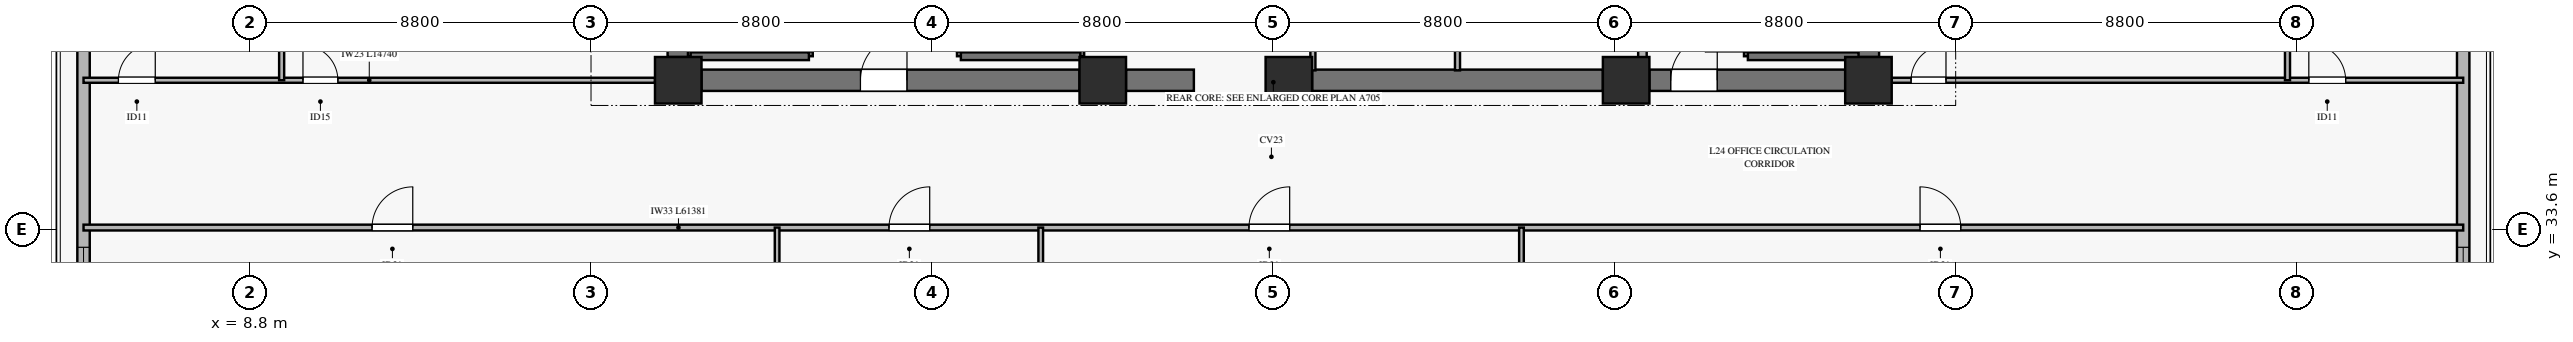
"""IFC4 building model, lengths in metres.
Left out: names, types, materials, properties, quantities, classifications, styles, units other than length and angle.
Written with IfcOpenShell. Run it as: python <this file> out.ifc"""

import sys

from ifc_helpers import new_model, si_unit, direction, frame, frame_2d, origin, origin_2d, place, context, subcontext, project, spatial, rectangle, extrude, source, transform, mapped, element, fill, save


model = new_model("IFC4")
c1 = context("Model", 3, precision=1e-05, world=origin(), true_north=direction((0.0, 1.0)))
c2 = subcontext(c1, "Body", "Model", "MODEL_VIEW")
j1 = project(units=[si_unit("LENGTHUNIT", "METRE"), si_unit("PLANEANGLEUNIT", "RADIAN")], contexts=[c1])
p1 = place(None, origin())
s1 = spatial("IfcSite", under=j1, at=p1, CompositionType="ELEMENT")
p2 = place(p1, origin())
s2 = spatial("IfcBuilding", under=s1, at=p2, CompositionType="ELEMENT")
p3 = place(p2, frame((0.0, 0.0, 99.7)))
s3 = spatial("IfcBuildingStorey", under=s2, at=p3, CompositionType="ELEMENT", Elevation=99.7)
m1 = source(origin(), c2, "Body", "SweptSolid", [
    extrude(rectangle(XDim=1.2, YDim=1.2, at=origin_2d()), origin(), (0.0, 0.0, 1.0), 3.68),
])
for number, where, z_axis, x_axis in (
    (1, (19.85, 37.45, 0.0), (0.0, 0.0, 1.0), (1.0, 0.0, 0.0)),
    (2, (30.8, 37.45, 0.0), (0.0, 0.0, 1.0), (1.0, 0.0, 0.0)),
    (3, (35.6, 37.45, 0.0), (0.0, 0.0, 1.0), (1.0, 0.0, 0.0)),
    (4, (44.3, 37.45, 0.0), (0.0, 0.0, 1.0), (1.0, 0.0, 0.0)),
    (5, (50.55, 37.45, 0.0), (0.0, 0.0, 1.0), (1.0, 0.0, 0.0)),
):
    element("IfcColumn", number, at=place(p3, frame(where, z_axis=z_axis, x_axis=x_axis)), inside=s3, PredefinedType="PILASTER", context=c2, shape_type="MappedRepresentation", body=[
        mapped(m1, transform((0.0, 0.0, 0.0), x_axis=(1.0, 0.0, 0.0), y_axis=(0.0, 1.0, 0.0), z_axis=(0.0, 0.0, 1.0), scale=1.0)),
    ])
p4 = place(p3, frame((20.45, 37.45, 0.0), z_axis=(0.0, 0.0, 1.0), x_axis=(1.0, 0.0, 0.0)))
e6 = element("IfcWall", 6, at=p4, inside=s3, PredefinedType="SHEAR", context=c2, shape_type="SweptSolid", body=[
    extrude(rectangle(XDim=9.75, YDim=0.55, at=frame_2d((4.875, 0.0))), origin(), (0.0, 0.0, 1.0), 3.68),
])
p5 = place(p4, frame((4.1, 0.0, 0.0)))
e7 = element("IfcOpeningElement", 7, at=p5, cuts=e6, PredefinedType="OPENING", context=c2, shape_type="SweptSolid", body=[
    extrude(rectangle(XDim=1.2, YDim=2.15, at=frame_2d((0.6, 1.075))), frame((0.0, 0.285, 0.0), z_axis=(0.0, -1.0, 0.0), x_axis=(1.0, 0.0, 0.0)), (0.0, 0.0, 1.0), 0.57),
])
p6 = place(p3, frame((31.4, 37.45, 0.0), z_axis=(0.0, 0.0, 1.0), x_axis=(1.0, 0.0, 0.0)))
e8 = element("IfcWall", 8, at=p6, inside=s3, PredefinedType="SHEAR", context=c2, shape_type="SweptSolid", body=[
    extrude(rectangle(XDim=1.75, YDim=0.55, at=frame_2d((0.875, 0.0))), origin(), (0.0, 0.0, 1.0), 3.68),
])
p7 = place(p3, frame((36.2, 37.45, 0.0), z_axis=(0.0, 0.0, 1.0), x_axis=(1.0, 0.0, 0.0)))
e9 = element("IfcWall", 9, at=p7, inside=s3, PredefinedType="SHEAR", context=c2, shape_type="SweptSolid", body=[
    extrude(rectangle(XDim=7.5, YDim=0.55, at=frame_2d((3.75, 0.0))), origin(), (0.0, 0.0, 1.0), 3.68),
])
p8 = place(p3, frame((44.9, 37.45, 0.0), z_axis=(0.0, 0.0, 1.0), x_axis=(1.0, 0.0, 0.0)))
e10 = element("IfcWall", 10, at=p8, inside=s3, PredefinedType="SHEAR", context=c2, shape_type="SweptSolid", body=[
    extrude(rectangle(XDim=5.05, YDim=0.55, at=frame_2d((2.525, 0.0))), origin(), (0.0, 0.0, 1.0), 3.68),
])
p9 = place(p8, frame((0.55, 0.0, 0.0)))
e11 = element("IfcOpeningElement", 11, at=p9, cuts=e10, PredefinedType="OPENING", context=c2, shape_type="SweptSolid", body=[
    extrude(rectangle(XDim=1.2, YDim=2.15, at=frame_2d((0.6, 1.075))), frame((0.0, 0.285, 0.0), z_axis=(0.0, -1.0, 0.0), x_axis=(1.0, 0.0, 0.0)), (0.0, 0.0, 1.0), 0.57),
])
for number, where, z_axis, x_axis in (
    (12, (19.85, 38.05, 0.0), (0.0, 0.0, 1.0), (0.0, 1.0, 0.0)),
    (13, (50.55, 38.05, 0.0), (0.0, 0.0, 1.0), (0.0, 1.0, 0.0)),
):
    element("IfcWall", number, at=place(p3, frame(where, z_axis=z_axis, x_axis=x_axis)), inside=s3, PredefinedType="SHEAR", context=c2, shape_type="SweptSolid", body=[
        extrude(rectangle(XDim=7.9, YDim=0.55, at=frame_2d((3.95, 0.0))), origin(), (0.0, 0.0, 1.0), 3.68),
    ])
p10 = place(p3, frame((4.51, 26.73, 0.0), z_axis=(0.0, 0.0, 1.0), x_axis=(0.0, 1.0, 0.0)))
e14 = element("IfcWall", 14, at=p10, inside=s3, PredefinedType="SOLIDWALL", context=c2, shape_type="SweptSolid", body=[
    extrude(rectangle(XDim=16.326, YDim=0.32, at=frame_2d((8.163, 0.0))), origin(), (0.0, 0.0, 1.0), 3.16),
])
p11 = place(p10, frame((4.011, 0.0, 0.45)))
e15 = element("IfcOpeningElement", 15, at=p11, cuts=e14, PredefinedType="OPENING", context=c2, shape_type="SweptSolid", body=[
    extrude(rectangle(XDim=2.4, YDim=2.1, at=frame_2d((1.2, 1.05))), frame((0.0, 0.17, 0.0), z_axis=(0.0, -1.0, 0.0), x_axis=(1.0, 0.0, 0.0)), (0.0, 0.0, 1.0), 0.34),
])
p12 = place(p3, frame((65.891, 26.73, 0.0), z_axis=(0.0, 0.0, 1.0), x_axis=(0.0, 1.0, 0.0)))
e16 = element("IfcWall", 16, at=p12, inside=s3, PredefinedType="SOLIDWALL", context=c2, shape_type="SweptSolid", body=[
    extrude(rectangle(XDim=16.326, YDim=0.32, at=frame_2d((8.163, 0.0))), origin(), (0.0, 0.0, 1.0), 3.16),
])
p13 = place(p12, frame((4.011, 0.0, 0.45)))
e17 = element("IfcOpeningElement", 17, at=p13, cuts=e16, PredefinedType="OPENING", context=c2, shape_type="SweptSolid", body=[
    extrude(rectangle(XDim=2.4, YDim=2.1, at=frame_2d((1.2, 1.05))), frame((0.0, 0.17, 0.0), z_axis=(0.0, -1.0, 0.0), x_axis=(1.0, 0.0, 0.0)), (0.0, 0.0, 1.0), 0.34),
])
p14 = place(p3, frame((20.17, 38.07, 0.0), z_axis=(0.0, 0.0, 1.0), x_axis=(0.0, 1.0, 0.0)))
e18 = element("IfcWall", 18, at=p14, inside=s3, PredefinedType="SOLIDWALL", context=c2, shape_type="SweptSolid", body=[
    extrude(rectangle(XDim=7.25, YDim=0.14, at=frame_2d((3.625, 0.0))), origin(), (0.0, 0.0, 1.0), 3.9),
])
p15 = place(p3, frame((23.22, 38.07, 0.0), z_axis=(0.0, 0.0, 1.0), x_axis=(0.0, 1.0, 0.0)))
e19 = element("IfcWall", 19, at=p15, inside=s3, PredefinedType="SOLIDWALL", context=c2, shape_type="SweptSolid", body=[
    extrude(rectangle(XDim=7.25, YDim=0.2, at=frame_2d((3.625, 0.0))), origin(), (0.0, 0.0, 1.0), 3.9),
])
p16 = place(p15, frame((0.11, 0.0, 0.0)))
e20 = element("IfcOpeningElement", 20, at=p16, cuts=e19, PredefinedType="OPENING", context=c2, shape_type="SweptSolid", body=[
    extrude(rectangle(XDim=1.1, YDim=2.15, at=frame_2d((0.55, 1.075))), frame((0.0, 0.11, 0.0), z_axis=(0.0, -1.0, 0.0), x_axis=(1.0, 0.0, 0.0)), (0.0, 0.0, 1.0), 0.22),
])
p17 = place(p3, frame((20.17, 38.07, 0.0), z_axis=(0.0, 0.0, 1.0), x_axis=(1.0, 0.0, 0.0)))
e21 = element("IfcWall", 21, at=p17, inside=s3, PredefinedType="SOLIDWALL", context=c2, shape_type="SweptSolid", body=[
    extrude(rectangle(XDim=3.05, YDim=0.2, at=frame_2d((1.525, 0.0))), origin(), (0.0, 0.0, 1.0), 3.9),
])
p18 = place(p3, frame((27.14, 38.07, 0.0), z_axis=(0.0, 0.0, 1.0), x_axis=(0.0, 1.0, 0.0)))
e22 = element("IfcWall", 22, at=p18, inside=s3, PredefinedType="SOLIDWALL", context=c2, shape_type="SweptSolid", body=[
    extrude(rectangle(XDim=7.25, YDim=0.2, at=frame_2d((3.625, 0.0))), origin(), (0.0, 0.0, 1.0), 3.9),
])
p19 = place(p18, frame((0.11, 0.0, 0.0)))
e23 = element("IfcOpeningElement", 23, at=p19, cuts=e22, PredefinedType="OPENING", context=c2, shape_type="SweptSolid", body=[
    extrude(rectangle(XDim=1.1, YDim=2.15, at=frame_2d((0.55, 1.075))), frame((0.0, 0.11, 0.0), z_axis=(0.0, -1.0, 0.0), x_axis=(1.0, 0.0, 0.0)), (0.0, 0.0, 1.0), 0.22),
])
p20 = place(p3, frame((30.22, 38.07, 0.0), z_axis=(0.0, 0.0, 1.0), x_axis=(0.0, 1.0, 0.0)))
e24 = element("IfcWall", 24, at=p20, inside=s3, PredefinedType="SOLIDWALL", context=c2, shape_type="SweptSolid", body=[
    extrude(rectangle(XDim=7.25, YDim=0.2, at=frame_2d((3.625, 0.0))), origin(), (0.0, 0.0, 1.0), 3.9),
])
p21 = place(p3, frame((27.14, 38.07, 0.0), z_axis=(0.0, 0.0, 1.0), x_axis=(1.0, 0.0, 0.0)))
e25 = element("IfcWall", 25, at=p21, inside=s3, PredefinedType="SOLIDWALL", context=c2, shape_type="SweptSolid", body=[
    extrude(rectangle(XDim=3.08, YDim=0.2, at=frame_2d((1.54, 0.0))), origin(), (0.0, 0.0, 1.0), 3.9),
])
p22 = place(p3, frame((47.44, 38.07, 0.0), z_axis=(0.0, 0.0, 1.0), x_axis=(0.0, 1.0, 0.0)))
e26 = element("IfcWall", 26, at=p22, inside=s3, PredefinedType="SOLIDWALL", context=c2, shape_type="SweptSolid", body=[
    extrude(rectangle(XDim=7.25, YDim=0.2, at=frame_2d((3.625, 0.0))), origin(), (0.0, 0.0, 1.0), 3.9),
])
p23 = place(p22, frame((0.11, 0.0, 0.0)))
e27 = element("IfcOpeningElement", 27, at=p23, cuts=e26, PredefinedType="OPENING", context=c2, shape_type="SweptSolid", body=[
    extrude(rectangle(XDim=1.1, YDim=2.15, at=frame_2d((0.55, 1.075))), frame((0.0, 0.11, 0.0), z_axis=(0.0, -1.0, 0.0), x_axis=(1.0, 0.0, 0.0)), (0.0, 0.0, 1.0), 0.22),
])
p24 = place(p3, frame((47.44, 38.07, 0.0), z_axis=(0.0, 0.0, 1.0), x_axis=(1.0, 0.0, 0.0)))
e28 = element("IfcWall", 28, at=p24, inside=s3, PredefinedType="SOLIDWALL", context=c2, shape_type="SweptSolid", body=[
    extrude(rectangle(XDim=2.855, YDim=0.2, at=frame_2d((1.427, 0.0))), origin(), (0.0, 0.0, 1.0), 3.9),
])
p25 = place(p3, frame((44.72, 37.705, 0.0), z_axis=(0.0, 0.0, 1.0), x_axis=(0.0, 1.0, 0.0)))
e29 = element("IfcWall", 29, at=p25, inside=s3, PredefinedType="SOLIDWALL", context=c2, shape_type="SweptSolid", body=[
    extrude(rectangle(XDim=7.515, YDim=0.22, at=frame_2d((3.757, 0.0))), origin(), (0.0, 0.0, 1.0), 3.68),
])
p26 = place(p3, frame((36.22, 37.705, 0.0), z_axis=(0.0, 0.0, 1.0), x_axis=(0.0, 1.0, 0.0)))
e30 = element("IfcWall", 30, at=p26, inside=s3, PredefinedType="PARTITIONING", context=c2, shape_type="SweptSolid", body=[
    extrude(rectangle(XDim=2.215, YDim=0.13, at=frame_2d((1.107, 0.0))), origin(), (0.0, 0.0, 1.0), 3.68),
])
p27 = place(p26, frame((0.905, 0.0, 0.0)))
e31 = element("IfcOpeningElement", 31, at=p27, cuts=e30, PredefinedType="OPENING", context=c2, shape_type="SweptSolid", body=[
    extrude(rectangle(XDim=0.9, YDim=2.1, at=frame_2d((0.45, 1.05))), frame((0.0, 0.075, 0.0), z_axis=(0.0, -1.0, 0.0), x_axis=(1.0, 0.0, 0.0)), (0.0, 0.0, 1.0), 0.15),
])
p28 = place(p3, frame((39.95, 37.705, 0.0), z_axis=(0.0, 0.0, 1.0), x_axis=(0.0, 1.0, 0.0)))
e32 = element("IfcWall", 32, at=p28, inside=s3, PredefinedType="PARTITIONING", context=c2, shape_type="SweptSolid", body=[
    extrude(rectangle(XDim=2.215, YDim=0.13, at=frame_2d((1.107, 0.0))), origin(), (0.0, 0.0, 1.0), 3.68),
])
p29 = place(p28, frame((0.615, 0.0, 0.0)))
e33 = element("IfcOpeningElement", 33, at=p29, cuts=e32, PredefinedType="OPENING", context=c2, shape_type="SweptSolid", body=[
    extrude(rectangle(XDim=0.9, YDim=2.1, at=frame_2d((0.45, 1.05))), frame((0.0, 0.075, 0.0), z_axis=(0.0, -1.0, 0.0), x_axis=(1.0, 0.0, 0.0)), (0.0, 0.0, 1.0), 0.15),
])
p30 = place(p3, frame((4.51, 33.65, 0.0), z_axis=(0.0, 0.0, 1.0), x_axis=(1.0, 0.0, 0.0)))
e34 = element("IfcWall", 34, at=p30, inside=s3, PredefinedType="PARTITIONING", context=c2, shape_type="SweptSolid", body=[
    extrude(rectangle(XDim=61.381, YDim=0.15, at=frame_2d((30.69, 0.0))), origin(), (0.0, 0.0, 1.0), 2.765),
])
p31 = place(p30, frame((7.442, 0.0, 0.0)))
e35 = element("IfcOpeningElement", 35, at=p31, cuts=e34, PredefinedType="OPENING", context=c2, shape_type="SweptSolid", body=[
    extrude(rectangle(XDim=1.05, YDim=2.15, at=frame_2d((0.525, 1.075))), frame((0.0, 0.085, 0.0), z_axis=(0.0, -1.0, 0.0), x_axis=(1.0, 0.0, 0.0)), (0.0, 0.0, 1.0), 0.17),
])
p32 = place(p30, frame((20.776, 0.0, 0.0)))
e36 = element("IfcOpeningElement", 36, at=p32, cuts=e34, PredefinedType="OPENING", context=c2, shape_type="SweptSolid", body=[
    extrude(rectangle(XDim=1.05, YDim=2.15, at=frame_2d((0.525, 1.075))), frame((0.0, 0.085, 0.0), z_axis=(0.0, -1.0, 0.0), x_axis=(1.0, 0.0, 0.0)), (0.0, 0.0, 1.0), 0.17),
])
p33 = place(p30, frame((30.061, 0.0, 0.0)))
e37 = element("IfcOpeningElement", 37, at=p33, cuts=e34, PredefinedType="OPENING", context=c2, shape_type="SweptSolid", body=[
    extrude(rectangle(XDim=1.05, YDim=2.15, at=frame_2d((0.525, 1.075))), frame((0.0, 0.085, 0.0), z_axis=(0.0, -1.0, 0.0), x_axis=(1.0, 0.0, 0.0)), (0.0, 0.0, 1.0), 0.17),
])
p34 = place(p30, frame((47.371, 0.0, 0.0)))
e38 = element("IfcOpeningElement", 38, at=p34, cuts=e34, PredefinedType="OPENING", context=c2, shape_type="SweptSolid", body=[
    extrude(rectangle(XDim=1.05, YDim=2.15, at=frame_2d((0.525, 1.075))), frame((0.0, 0.085, 0.0), z_axis=(0.0, -1.0, 0.0), x_axis=(1.0, 0.0, 0.0)), (0.0, 0.0, 1.0), 0.17),
])
for number, where, z_axis, x_axis in (
    (39, (22.4, 6.462, 0.0), (0.0, 0.0, 1.0), (0.0, 1.0, 0.0)),
    (40, (29.2, 6.462, 0.0), (0.0, 0.0, 1.0), (0.0, 1.0, 0.0)),
    (41, (41.6, 6.462, 0.0), (0.0, 0.0, 1.0), (0.0, 1.0, 0.0)),
):
    element("IfcWall", number, at=place(p3, frame(where, z_axis=z_axis, x_axis=x_axis)), inside=s3, PredefinedType="PARTITIONING", context=c2, shape_type="SweptSolid", body=[
        extrude(rectangle(XDim=27.188, YDim=0.12, at=frame_2d((13.594, 0.0))), origin(), (0.0, 0.0, 1.0), 3.165),
    ])
p35 = place(p3, frame((4.51, 37.45, 0.0), z_axis=(0.0, 0.0, 1.0), x_axis=(1.0, 0.0, 0.0)))
e42 = element("IfcWall", 42, at=p35, inside=s3, PredefinedType="PARTITIONING", context=c2, shape_type="SweptSolid", body=[
    extrude(rectangle(XDim=14.74, YDim=0.13, at=frame_2d((7.37, 0.0))), origin(), (0.0, 0.0, 1.0), 3.165),
])
p36 = place(p35, frame((0.9, 0.0, 0.0)))
e43 = element("IfcOpeningElement", 43, at=p36, cuts=e42, PredefinedType="OPENING", context=c2, shape_type="SweptSolid", body=[
    extrude(rectangle(XDim=0.95, YDim=2.1, at=frame_2d((0.475, 1.05))), frame((0.0, 0.075, 0.0), z_axis=(0.0, -1.0, 0.0), x_axis=(1.0, 0.0, 0.0)), (0.0, 0.0, 1.0), 0.15),
])
p37 = place(p35, frame((5.66, 0.0, 0.0)))
e44 = element("IfcOpeningElement", 44, at=p37, cuts=e42, PredefinedType="OPENING", context=c2, shape_type="SweptSolid", body=[
    extrude(rectangle(XDim=0.9, YDim=2.1, at=frame_2d((0.45, 1.05))), frame((0.0, 0.075, 0.0), z_axis=(0.0, -1.0, 0.0), x_axis=(1.0, 0.0, 0.0)), (0.0, 0.0, 1.0), 0.15),
])
p38 = place(p3, frame((9.62, 37.45, 0.0), z_axis=(0.0, 0.0, 1.0), x_axis=(0.0, 1.0, 0.0)))
e45 = element("IfcWall", 45, at=p38, inside=s3, PredefinedType="PARTITIONING", context=c2, shape_type="SweptSolid", body=[
    extrude(rectangle(XDim=8.8, YDim=0.13, at=frame_2d((4.4, 0.0))), origin(), (0.0, 0.0, 1.0), 3.68),
])
p39 = place(p3, frame((51.15, 37.45, 0.0), z_axis=(0.0, 0.0, 1.0), x_axis=(1.0, 0.0, 0.0)))
e46 = element("IfcWall", 46, at=p39, inside=s3, PredefinedType="PARTITIONING", context=c2, shape_type="SweptSolid", body=[
    extrude(rectangle(XDim=14.741, YDim=0.13, at=frame_2d((7.371, 0.0))), origin(), (0.0, 0.0, 1.0), 3.165),
])
p40 = place(p39, frame((0.5, 0.0, 0.0)))
e47 = element("IfcOpeningElement", 47, at=p40, cuts=e46, PredefinedType="OPENING", context=c2, shape_type="SweptSolid", body=[
    extrude(rectangle(XDim=0.9, YDim=2.1, at=frame_2d((0.45, 1.05))), frame((0.0, 0.075, 0.0), z_axis=(0.0, -1.0, 0.0), x_axis=(1.0, 0.0, 0.0)), (0.0, 0.0, 1.0), 0.15),
])
p41 = place(p39, frame((10.759, 0.0, 0.0)))
e48 = element("IfcOpeningElement", 48, at=p41, cuts=e46, PredefinedType="OPENING", context=c2, shape_type="SweptSolid", body=[
    extrude(rectangle(XDim=0.95, YDim=2.1, at=frame_2d((0.475, 1.05))), frame((0.0, 0.075, 0.0), z_axis=(0.0, -1.0, 0.0), x_axis=(1.0, 0.0, 0.0)), (0.0, 0.0, 1.0), 0.15),
])
p42 = place(p3, frame((61.359, 37.45, 0.0), z_axis=(0.0, 0.0, 1.0), x_axis=(0.0, 1.0, 0.0)))
e49 = element("IfcWall", 49, at=p42, inside=s3, PredefinedType="PARTITIONING", context=c2, shape_type="SweptSolid", body=[
    extrude(rectangle(XDim=8.8, YDim=0.13, at=frame_2d((4.4, 0.0))), origin(), (0.0, 0.0, 1.0), 3.68),
])
m2 = source(origin(), c2, "Body", "SweptSolid", [
    extrude(rectangle(XDim=2.4, YDim=2.1, at=frame_2d((1.2, 1.05))), frame((0.0, 0.03, 0.0), z_axis=(0.0, -1.0, 0.0), x_axis=(1.0, 0.0, 0.0)), (0.0, 0.0, 1.0), 0.06),
])
p43 = place(p11, origin())
e50 = element("IfcWindow", 50, at=p43, inside=s3, PartitioningType="SINGLE_PANEL", PredefinedType="WINDOW", context=c2, shape_type="MappedRepresentation", body=[
    mapped(m2, transform((0.0, 0.0, 0.0), x_axis=(1.0, 0.0, 0.0), y_axis=(0.0, 1.0, 0.0), z_axis=(0.0, 0.0, 1.0), scale=1.0)),
])
fill(e15, e50)
p44 = place(p13, origin())
e51 = element("IfcWindow", 51, at=p44, inside=s3, PartitioningType="SINGLE_PANEL", PredefinedType="WINDOW", context=c2, shape_type="MappedRepresentation", body=[
    mapped(m2, transform((0.0, 0.0, 0.0), x_axis=(1.0, 0.0, 0.0), y_axis=(0.0, 1.0, 0.0), z_axis=(0.0, 0.0, 1.0), scale=1.0)),
])
fill(e17, e51)
m3 = source(origin(), c2, "Body", "SweptSolid", [
    extrude(rectangle(XDim=1.2, YDim=2.15, at=frame_2d((0.6, 1.075))), frame((0.0, 0.025, 0.0), z_axis=(0.0, -1.0, 0.0), x_axis=(1.0, 0.0, 0.0)), (0.0, 0.0, 1.0), 0.05),
])
p45 = place(p5, origin())
e52 = element("IfcDoor", 52, at=p45, inside=s3, OperationType="SINGLE_SWING_RIGHT", PredefinedType="DOOR", context=c2, shape_type="MappedRepresentation", body=[
    mapped(m3, transform((0.0, 0.0, 0.0), x_axis=(1.0, 0.0, 0.0), y_axis=(0.0, 1.0, 0.0), z_axis=(0.0, 0.0, 1.0), scale=1.0)),
])
fill(e7, e52)
p46 = place(p9, origin())
e53 = element("IfcDoor", 53, at=p46, inside=s3, OperationType="SINGLE_SWING_RIGHT", PredefinedType="DOOR", context=c2, shape_type="MappedRepresentation", body=[
    mapped(m3, transform((0.0, 0.0, 0.0), x_axis=(1.0, 0.0, 0.0), y_axis=(0.0, 1.0, 0.0), z_axis=(0.0, 0.0, 1.0), scale=1.0)),
])
fill(e11, e53)
m4 = source(origin(), c2, "Body", "SweptSolid", [
    extrude(rectangle(XDim=1.05, YDim=2.15, at=frame_2d((0.525, 1.075))), frame((0.0, 0.025, 0.0), z_axis=(0.0, -1.0, 0.0), x_axis=(1.0, 0.0, 0.0)), (0.0, 0.0, 1.0), 0.05),
])
p47 = place(p31, origin())
e54 = element("IfcDoor", 54, at=p47, inside=s3, OperationType="SINGLE_SWING_RIGHT", PredefinedType="DOOR", context=c2, shape_type="MappedRepresentation", body=[
    mapped(m4, transform((0.0, 0.0, 0.0), x_axis=(1.0, 0.0, 0.0), y_axis=(0.0, 1.0, 0.0), z_axis=(0.0, 0.0, 1.0), scale=1.0)),
])
fill(e35, e54)
p48 = place(p32, origin())
e55 = element("IfcDoor", 55, at=p48, inside=s3, OperationType="SINGLE_SWING_RIGHT", PredefinedType="DOOR", context=c2, shape_type="MappedRepresentation", body=[
    mapped(m4, transform((0.0, 0.0, 0.0), x_axis=(1.0, 0.0, 0.0), y_axis=(0.0, 1.0, 0.0), z_axis=(0.0, 0.0, 1.0), scale=1.0)),
])
fill(e36, e55)
p49 = place(p33, origin())
e56 = element("IfcDoor", 56, at=p49, inside=s3, OperationType="SINGLE_SWING_RIGHT", PredefinedType="DOOR", context=c2, shape_type="MappedRepresentation", body=[
    mapped(m4, transform((0.0, 0.0, 0.0), x_axis=(1.0, 0.0, 0.0), y_axis=(0.0, 1.0, 0.0), z_axis=(0.0, 0.0, 1.0), scale=1.0)),
])
fill(e37, e56)
p50 = place(p34, origin())
e57 = element("IfcDoor", 57, at=p50, inside=s3, OperationType="SINGLE_SWING_LEFT", PredefinedType="DOOR", context=c2, shape_type="MappedRepresentation", body=[
    mapped(m4, transform((0.0, 0.0, 0.0), x_axis=(1.0, 0.0, 0.0), y_axis=(0.0, 1.0, 0.0), z_axis=(0.0, 0.0, 1.0), scale=1.0)),
])
fill(e38, e57)
m5 = source(origin(), c2, "Body", "SweptSolid", [
    extrude(rectangle(XDim=0.95, YDim=2.1, at=frame_2d((0.475, 1.05))), frame((0.0, 0.025, 0.0), z_axis=(0.0, -1.0, 0.0), x_axis=(1.0, 0.0, 0.0)), (0.0, 0.0, 1.0), 0.05),
])
p51 = place(p36, origin())
e58 = element("IfcDoor", 58, at=p51, inside=s3, OperationType="SINGLE_SWING_RIGHT", PredefinedType="DOOR", context=c2, shape_type="MappedRepresentation", body=[
    mapped(m5, transform((0.0, 0.0, 0.0), x_axis=(1.0, 0.0, 0.0), y_axis=(0.0, 1.0, 0.0), z_axis=(0.0, 0.0, 1.0), scale=1.0)),
])
fill(e43, e58)
m6 = source(origin(), c2, "Body", "SweptSolid", [
    extrude(rectangle(XDim=0.9, YDim=2.1, at=frame_2d((0.45, 1.05))), frame((0.0, 0.025, 0.0), z_axis=(0.0, -1.0, 0.0), x_axis=(1.0, 0.0, 0.0)), (0.0, 0.0, 1.0), 0.05),
])
p52 = place(p37, origin())
e59 = element("IfcDoor", 59, at=p52, inside=s3, OperationType="SINGLE_SWING_LEFT", PredefinedType="DOOR", context=c2, shape_type="MappedRepresentation", body=[
    mapped(m6, transform((0.0, 0.0, 0.0), x_axis=(1.0, 0.0, 0.0), y_axis=(0.0, 1.0, 0.0), z_axis=(0.0, 0.0, 1.0), scale=1.0)),
])
fill(e44, e59)
p53 = place(p40, origin())
e60 = element("IfcDoor", 60, at=p53, inside=s3, OperationType="SINGLE_SWING_RIGHT", PredefinedType="DOOR", context=c2, shape_type="MappedRepresentation", body=[
    mapped(m6, transform((0.0, 0.0, 0.0), x_axis=(1.0, 0.0, 0.0), y_axis=(0.0, 1.0, 0.0), z_axis=(0.0, 0.0, 1.0), scale=1.0)),
])
fill(e47, e60)
p54 = place(p41, origin())
e61 = element("IfcDoor", 61, at=p54, inside=s3, OperationType="SINGLE_SWING_LEFT", PredefinedType="DOOR", context=c2, shape_type="MappedRepresentation", body=[
    mapped(m5, transform((0.0, 0.0, 0.0), x_axis=(1.0, 0.0, 0.0), y_axis=(0.0, 1.0, 0.0), z_axis=(0.0, 0.0, 1.0), scale=1.0)),
])
fill(e48, e61)
save(model, sys.argv[1])
